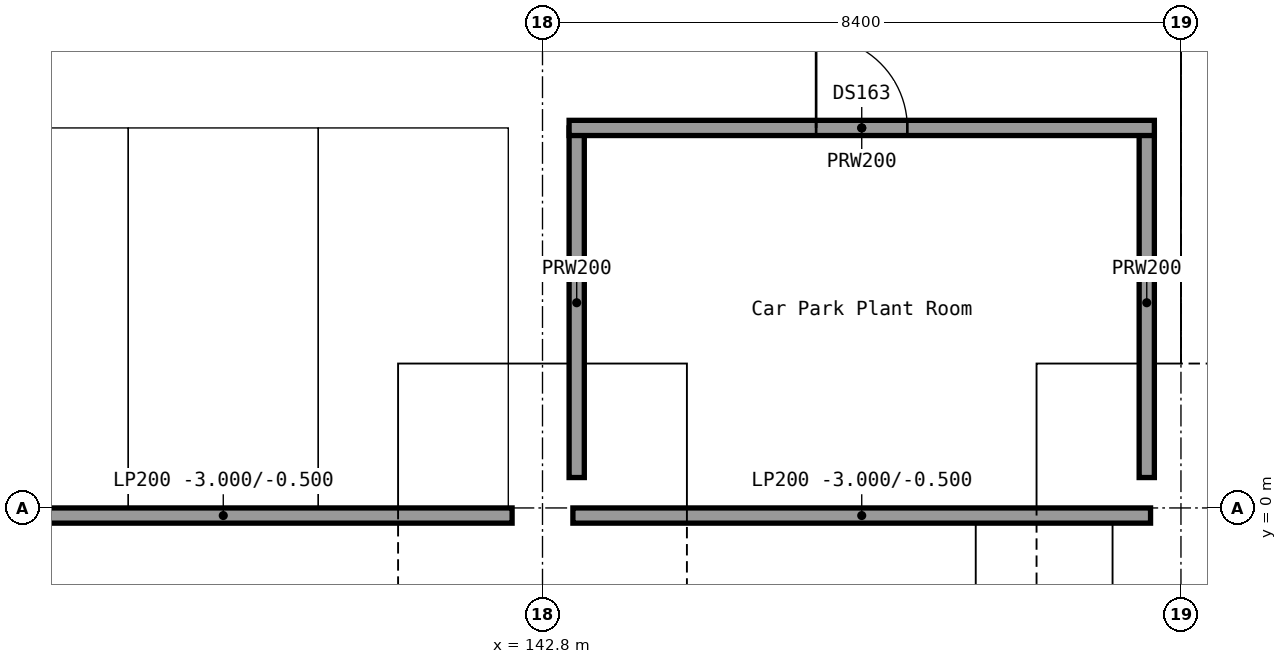
"""IFC4 building model, lengths in metres.
Left out: names, types, materials, properties, quantities, classifications, styles, units other than length and angle.
Written with IfcOpenShell. Run it as: python <this file> out.ifc"""

import sys

from ifc_helpers import new_model, si_unit, direction, frame, frame_2d, origin, origin_2d, place, context, subcontext, project, spatial, rectangle, extrude, element, fill, save


model = new_model("IFC4")
c1 = context("Model", 3, precision=1e-05, world=origin(), true_north=direction((0.0, 1.0)))
c2 = subcontext(c1, "Body", "Model", "MODEL_VIEW")
j1 = project(units=[si_unit("LENGTHUNIT", "METRE"), si_unit("PLANEANGLEUNIT", "RADIAN")], contexts=[c1])
p1 = place(None, origin())
s1 = spatial("IfcSite", under=j1, at=p1, CompositionType="ELEMENT")
p2 = place(p1, origin())
s2 = spatial("IfcBuilding", under=s1, at=p2, CompositionType="ELEMENT")
p3 = place(p2, frame((0.0, 0.0, -3.0)))
s3 = spatial("IfcBuildingStorey", under=s2, at=p3, CompositionType="ELEMENT", Elevation=-3.0)
for number, where, z_axis, x_axis in (
    (1, (142.8, 0.0, 0.0), (0.0, 0.0, 1.0), (1.0, 0.0, 0.0)),
    (2, (151.2, 0.0, 0.0), (0.0, 0.0, 1.0), (1.0, 0.0, 0.0)),
):
    element("IfcColumn", number, at=place(p3, frame(where, z_axis=z_axis, x_axis=x_axis)), inside=s3, PredefinedType="COLUMN", context=c2, shape_type="SweptSolid", body=[
        extrude(rectangle(XDim=0.8, YDim=0.8, at=origin_2d()), origin(), (0.0, 0.0, 1.0), 2.5),
    ])
p4 = place(p3, frame((134.8, -0.1, 0.0), z_axis=(0.0, 0.0, 1.0), x_axis=(1.0, 0.0, 0.0)))
e3 = element("IfcWall", 3, at=p4, inside=s3, PredefinedType="SOLIDWALL", context=c2, shape_type="SweptSolid", body=[
    extrude(rectangle(XDim=7.6, YDim=0.2, at=frame_2d((3.8, 0.0))), origin(), (0.0, 0.0, 1.0), 2.5),
])
p5 = place(p3, frame((143.2, -0.1, 0.0), z_axis=(0.0, 0.0, 1.0), x_axis=(1.0, 0.0, 0.0)))
e4 = element("IfcWall", 4, at=p5, inside=s3, PredefinedType="SOLIDWALL", context=c2, shape_type="SweptSolid", body=[
    extrude(rectangle(XDim=7.6, YDim=0.2, at=frame_2d((3.8, 0.0))), origin(), (0.0, 0.0, 1.0), 2.5),
])
for number, where, z_axis, x_axis in (
    (5, (143.25, 0.4, 0.0), (0.0, 0.0, 1.0), (0.0, 1.0, 0.0)),
    (6, (150.75, 0.4, 0.0), (0.0, 0.0, 1.0), (0.0, 1.0, 0.0)),
):
    element("IfcWall", number, at=place(p3, frame(where, z_axis=z_axis, x_axis=x_axis)), inside=s3, PredefinedType="PARTITIONING", context=c2, shape_type="SweptSolid", body=[
        extrude(rectangle(XDim=4.6, YDim=0.2, at=frame_2d((2.3, 0.0))), origin(), (0.0, 0.0, 1.0), 2.5),
    ])
p6 = place(p3, frame((143.15, 5.0, 0.0), z_axis=(0.0, 0.0, 1.0), x_axis=(1.0, 0.0, 0.0)))
e7 = element("IfcWall", 7, at=p6, inside=s3, PredefinedType="PARTITIONING", context=c2, shape_type="SweptSolid", body=[
    extrude(rectangle(XDim=7.7, YDim=0.2, at=frame_2d((3.85, 0.0))), origin(), (0.0, 0.0, 1.0), 2.5),
])
p7 = place(p6, frame((3.25, 0.0, 0.0)))
e8 = element("IfcOpeningElement", 8, at=p7, cuts=e7, PredefinedType="OPENING", context=c2, shape_type="SweptSolid", body=[
    extrude(rectangle(XDim=1.2, YDim=2.1, at=frame_2d((0.6, 1.05))), frame((0.0, 0.1, 0.0), z_axis=(0.0, -1.0, 0.0), x_axis=(1.0, 0.0, 0.0)), (0.0, 0.0, 1.0), 0.2),
])
p8 = place(p7, origin())
e9 = element("IfcDoor", 9, at=p8, inside=s3, OperationType="SINGLE_SWING_LEFT", PredefinedType="DOOR", context=c2, shape_type="SweptSolid", body=[
    extrude(rectangle(XDim=1.2, YDim=2.1, at=frame_2d((0.6, 1.05))), frame((0.0, 0.025, 0.0), z_axis=(0.0, -1.0, 0.0), x_axis=(1.0, 0.0, 0.0)), (0.0, 0.0, 1.0), 0.05),
])
fill(e8, e9)
save(model, sys.argv[1])
